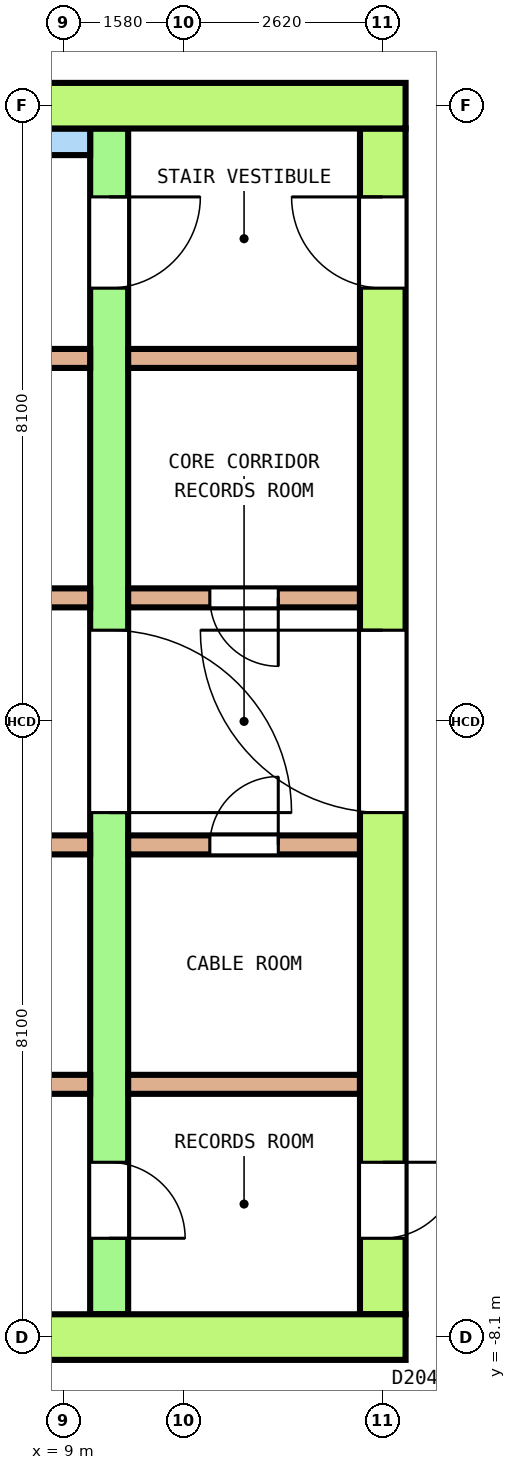
"""IFC4 building model, lengths in metres.
Left out: names, types, materials, properties, quantities, classifications, styles, units other than length and angle.
Written with IfcOpenShell. Run it as: python <this file> out.ifc"""

import sys

from ifc_helpers import new_model, si_unit, direction, frame, frame_2d, origin, place, context, subcontext, project, spatial, polyline, rectangle, outline, extrude, element, fill, save


model = new_model("IFC4")
c1 = context("Model", 3, precision=1e-05, world=origin(), true_north=direction((0.0, 1.0)))
c2 = subcontext(c1, "Body", "Model", "MODEL_VIEW")
j1 = project(units=[si_unit("LENGTHUNIT", "METRE"), si_unit("PLANEANGLEUNIT", "RADIAN")], contexts=[c1])
p1 = place(None, origin())
s1 = spatial("IfcSite", under=j1, at=p1, CompositionType="ELEMENT")
p2 = place(p1, origin())
s2 = spatial("IfcBuilding", under=s1, at=p2, CompositionType="ELEMENT")
p3 = place(p2, frame((0.0, 0.0, 245.4)))
s3 = spatial("IfcBuildingStorey", under=s2, at=p3, CompositionType="ELEMENT", Elevation=245.4)
p4 = place(p3, frame((13.515, -19.392, 0.0), z_axis=(0.0, 0.0, 1.0), x_axis=(0.499997939216, 0.866026593575, 0.0)))
e1 = element("IfcWall", 1, at=p4, inside=s3, PredefinedType="SOLIDWALL", context=c2, shape_type="SweptSolid", body=[
    extrude(outline(polyline([(-0.027, -0.1), (0.979, -0.1), (1.986, -0.1), (2.992, -0.1), (3.999, -0.1), (5.005, -0.1), (6.011, -0.1), (7.018, -0.1), (8.024, -0.1), (9.03, -0.1), (10.037, -0.1), (11.043, -0.1), (12.049, -0.1), (13.056, -0.1), (14.062, -0.1), (15.068, -0.1), (16.075, -0.1), (17.081, -0.1), (18.087, -0.1), (19.094, -0.1), (20.1, -0.1), (20.046, 0.1), (19.045, 0.1), (18.044, 0.1), (17.043, 0.1), (16.042, 0.1), (15.042, 0.1), (14.041, 0.1), (13.04, 0.1), (12.039, 0.1), (11.038, 0.1), (10.037, 0.1), (9.036, 0.1), (8.035, 0.1), (7.034, 0.1), (6.033, 0.1), (5.032, 0.1), (4.031, 0.1), (3.03, 0.1), (2.029, 0.1), (1.028, 0.1), (0.027, 0.1), (-0.027, -0.1)])), origin(), (0.0, 0.0, 1.0), 3.7),
])
p5 = place(p4, frame((0.557, 0.0, 0.1)))
e2 = element("IfcOpeningElement", 2, at=p5, cuts=e1, PredefinedType="OPENING", context=c2, shape_type="SweptSolid", body=[
    extrude(rectangle(XDim=2.9, YDim=2.65, at=frame_2d((1.45, 1.325))), frame((0.0, 0.11, 0.0), z_axis=(0.0, -1.0, 0.0), x_axis=(1.0, 0.0, 0.0)), (0.0, 0.0, 1.0), 0.22),
])
p6 = place(p4, frame((4.572, 0.0, 0.1)))
e3 = element("IfcOpeningElement", 3, at=p6, cuts=e1, PredefinedType="OPENING", context=c2, shape_type="SweptSolid", body=[
    extrude(rectangle(XDim=2.9, YDim=2.65, at=frame_2d((1.45, 1.325))), frame((0.0, 0.11, 0.0), z_axis=(0.0, -1.0, 0.0), x_axis=(1.0, 0.0, 0.0)), (0.0, 0.0, 1.0), 0.22),
])
p7 = place(p4, frame((9.137, 0.0, 0.0)))
e4 = element("IfcOpeningElement", 4, at=p7, cuts=e1, PredefinedType="OPENING", context=c2, shape_type="SweptSolid", body=[
    extrude(rectangle(XDim=1.8, YDim=2.4, at=frame_2d((0.9, 1.2))), frame((0.0, 0.11, 0.0), z_axis=(0.0, -1.0, 0.0), x_axis=(1.0, 0.0, 0.0)), (0.0, 0.0, 1.0), 0.22),
])
p8 = place(p4, frame((9.137, 0.0, 2.55)))
e5 = element("IfcOpeningElement", 5, at=p8, cuts=e1, PredefinedType="OPENING", context=c2, shape_type="SweptSolid", body=[
    extrude(rectangle(XDim=1.8, YDim=0.2, at=frame_2d((0.9, 0.1))), frame((0.0, 0.11, 0.0), z_axis=(0.0, -1.0, 0.0), x_axis=(1.0, 0.0, 0.0)), (0.0, 0.0, 1.0), 0.22),
])
p9 = place(p4, frame((12.601, 0.0, 0.1)))
e6 = element("IfcOpeningElement", 6, at=p9, cuts=e1, PredefinedType="OPENING", context=c2, shape_type="SweptSolid", body=[
    extrude(rectangle(XDim=2.9, YDim=2.65, at=frame_2d((1.45, 1.325))), frame((0.0, 0.11, 0.0), z_axis=(0.0, -1.0, 0.0), x_axis=(1.0, 0.0, 0.0)), (0.0, 0.0, 1.0), 0.22),
])
p10 = place(p4, frame((16.616, 0.0, 0.1)))
e7 = element("IfcOpeningElement", 7, at=p10, cuts=e1, PredefinedType="OPENING", context=c2, shape_type="SweptSolid", body=[
    extrude(rectangle(XDim=2.9, YDim=2.65, at=frame_2d((1.45, 1.325))), frame((0.0, 0.11, 0.0), z_axis=(0.0, -1.0, 0.0), x_axis=(1.0, 0.0, 0.0)), (0.0, 0.0, 1.0), 0.22),
])
p11 = place(p3, frame((-13.5, 8.1, 0.0), z_axis=(0.0, 0.0, 1.0), x_axis=(1.0, 0.0, 0.0)))
e8 = element("IfcWall", 8, at=p11, inside=s3, PredefinedType="SHEAR", context=c2, shape_type="SweptSolid", body=[
    extrude(rectangle(XDim=27.0, YDim=0.6, at=frame_2d((13.5, 0.0))), origin(), (0.0, 0.0, 1.0), 3.7),
])
p12 = place(p11, frame((14.425, 0.0, 0.0)))
e9 = element("IfcOpeningElement", 9, at=p12, cuts=e8, PredefinedType="OPENING", context=c2, shape_type="SweptSolid", body=[
    extrude(rectangle(XDim=1.4, YDim=2.1, at=frame_2d((0.7, 1.05))), frame((0.0, 0.31, 0.0), z_axis=(0.0, -1.0, 0.0), x_axis=(1.0, 0.0, 0.0)), (0.0, 0.0, 1.0), 0.62),
])
p13 = place(p3, frame((-13.5, -8.1, 0.0), z_axis=(0.0, 0.0, 1.0), x_axis=(1.0, 0.0, 0.0)))
e10 = element("IfcWall", 10, at=p13, inside=s3, PredefinedType="SHEAR", context=c2, shape_type="SweptSolid", body=[
    extrude(rectangle(XDim=27.0, YDim=0.6, at=frame_2d((13.5, 0.0))), origin(), (0.0, 0.0, 1.0), 3.7),
])
p14 = place(p13, frame((15.05, 0.0, 0.0)))
e11 = element("IfcOpeningElement", 11, at=p14, cuts=e10, PredefinedType="OPENING", context=c2, shape_type="SweptSolid", body=[
    extrude(rectangle(XDim=1.2, YDim=2.1, at=frame_2d((0.6, 1.05))), frame((0.0, 0.31, 0.0), z_axis=(0.0, -1.0, 0.0), x_axis=(1.0, 0.0, 0.0)), (0.0, 0.0, 1.0), 0.62),
])
p15 = place(p3, frame((13.2, -7.8, 0.0), z_axis=(0.0, 0.0, 1.0), x_axis=(0.0, 1.0, 0.0)))
e12 = element("IfcWall", 12, at=p15, inside=s3, PredefinedType="SHEAR", context=c2, shape_type="SweptSolid", body=[
    extrude(rectangle(XDim=15.6, YDim=0.6, at=frame_2d((7.8, 0.0))), origin(), (0.0, 0.0, 1.0), 3.7),
])
p16 = place(p15, frame((6.6, 0.0, 0.0)))
e13 = element("IfcOpeningElement", 13, at=p16, cuts=e12, PredefinedType="OPENING", context=c2, shape_type="SweptSolid", body=[
    extrude(rectangle(XDim=2.4, YDim=2.1, at=frame_2d((1.2, 1.05))), frame((0.0, 0.31, 0.0), z_axis=(0.0, -1.0, 0.0), x_axis=(1.0, 0.0, 0.0)), (0.0, 0.0, 1.0), 0.62),
])
p17 = place(p15, frame((13.5, 0.0, 0.0)))
e14 = element("IfcOpeningElement", 14, at=p17, cuts=e12, PredefinedType="OPENING", context=c2, shape_type="SweptSolid", body=[
    extrude(rectangle(XDim=1.2, YDim=2.1, at=frame_2d((0.6, 1.05))), frame((0.0, 0.31, 0.0), z_axis=(0.0, -1.0, 0.0), x_axis=(1.0, 0.0, 0.0)), (0.0, 0.0, 1.0), 0.62),
])
p18 = place(p15, frame((1.0, 0.0, 0.0)))
e15 = element("IfcOpeningElement", 15, at=p18, cuts=e12, PredefinedType="OPENING", context=c2, shape_type="SweptSolid", body=[
    extrude(rectangle(XDim=1.0, YDim=2.1, at=frame_2d((0.5, 1.05))), frame((0.0, 0.31, 0.0), z_axis=(0.0, -1.0, 0.0), x_axis=(1.0, 0.0, 0.0)), (0.0, 0.0, 1.0), 0.62),
])
p19 = place(p3, frame((9.6, -7.8, 0.0), z_axis=(0.0, 0.0, 1.0), x_axis=(0.0, 1.0, 0.0)))
e16 = element("IfcWall", 16, at=p19, inside=s3, PredefinedType="SHEAR", context=c2, shape_type="SweptSolid", body=[
    extrude(rectangle(XDim=15.6, YDim=0.5, at=frame_2d((7.8, 0.0))), origin(), (0.0, 0.0, 1.0), 3.7),
])
p20 = place(p19, frame((6.6, 0.0, 0.0)))
e17 = element("IfcOpeningElement", 17, at=p20, cuts=e16, PredefinedType="OPENING", context=c2, shape_type="SweptSolid", body=[
    extrude(rectangle(XDim=2.4, YDim=2.1, at=frame_2d((1.2, 1.05))), frame((0.0, 0.26, 0.0), z_axis=(0.0, -1.0, 0.0), x_axis=(1.0, 0.0, 0.0)), (0.0, 0.0, 1.0), 0.52),
])
p21 = place(p19, frame((13.5, 0.0, 0.0)))
e18 = element("IfcOpeningElement", 18, at=p21, cuts=e16, PredefinedType="OPENING", context=c2, shape_type="SweptSolid", body=[
    extrude(rectangle(XDim=1.2, YDim=2.1, at=frame_2d((0.6, 1.05))), frame((0.0, 0.26, 0.0), z_axis=(0.0, -1.0, 0.0), x_axis=(1.0, 0.0, 0.0)), (0.0, 0.0, 1.0), 0.52),
])
p22 = place(p19, frame((1.0, 0.0, 0.0)))
e19 = element("IfcOpeningElement", 19, at=p22, cuts=e16, PredefinedType="OPENING", context=c2, shape_type="SweptSolid", body=[
    extrude(rectangle(XDim=1.0, YDim=2.1, at=frame_2d((0.5, 1.05))), frame((0.0, 0.26, 0.0), z_axis=(0.0, -1.0, 0.0), x_axis=(1.0, 0.0, 0.0)), (0.0, 0.0, 1.0), 0.52),
])
p23 = place(p3, frame((-9.35, 1.625, 0.0), z_axis=(0.0, 0.0, 1.0), x_axis=(1.0, 0.0, 0.0)))
e20 = element("IfcWall", 20, at=p23, inside=s3, PredefinedType="SOLIDWALL", context=c2, shape_type="SweptSolid", body=[
    extrude(rectangle(XDim=18.7, YDim=0.25, at=frame_2d((9.35, 0.0))), origin(), (0.0, 0.0, 1.0), 3.7),
])
p24 = place(p23, frame((7.65, 0.0, 0.0)))
e21 = element("IfcOpeningElement", 21, at=p24, cuts=e20, PredefinedType="OPENING", context=c2, shape_type="SweptSolid", body=[
    extrude(rectangle(XDim=1.1, YDim=2.1, at=frame_2d((0.55, 1.05))), frame((0.0, 0.135, 0.0), z_axis=(0.0, -1.0, 0.0), x_axis=(1.0, 0.0, 0.0)), (0.0, 0.0, 1.0), 0.27),
])
p25 = place(p23, frame((9.95, 0.0, 0.0)))
e22 = element("IfcOpeningElement", 22, at=p25, cuts=e20, PredefinedType="OPENING", context=c2, shape_type="SweptSolid", body=[
    extrude(rectangle(XDim=1.1, YDim=2.1, at=frame_2d((0.55, 1.05))), frame((0.0, 0.135, 0.0), z_axis=(0.0, -1.0, 0.0), x_axis=(1.0, 0.0, 0.0)), (0.0, 0.0, 1.0), 0.27),
])
p26 = place(p23, frame((12.4, 0.0, 0.0)))
e23 = element("IfcOpeningElement", 23, at=p26, cuts=e20, PredefinedType="OPENING", context=c2, shape_type="SweptSolid", body=[
    extrude(rectangle(XDim=1.1, YDim=2.1, at=frame_2d((0.55, 1.05))), frame((0.0, 0.135, 0.0), z_axis=(0.0, -1.0, 0.0), x_axis=(1.0, 0.0, 0.0)), (0.0, 0.0, 1.0), 0.27),
])
p27 = place(p23, frame((0.575, 0.0, 0.0)))
e24 = element("IfcOpeningElement", 24, at=p27, cuts=e20, PredefinedType="OPENING", context=c2, shape_type="SweptSolid", body=[
    extrude(rectangle(XDim=0.9, YDim=2.1, at=frame_2d((0.45, 1.05))), frame((0.0, 0.135, 0.0), z_axis=(0.0, -1.0, 0.0), x_axis=(1.0, 0.0, 0.0)), (0.0, 0.0, 1.0), 0.27),
])
p28 = place(p23, frame((2.919, 0.0, 0.0)))
e25 = element("IfcOpeningElement", 25, at=p28, cuts=e20, PredefinedType="OPENING", context=c2, shape_type="SweptSolid", body=[
    extrude(rectangle(XDim=0.9, YDim=2.1, at=frame_2d((0.45, 1.05))), frame((0.0, 0.135, 0.0), z_axis=(0.0, -1.0, 0.0), x_axis=(1.0, 0.0, 0.0)), (0.0, 0.0, 1.0), 0.27),
])
p29 = place(p23, frame((5.281, 0.0, 0.0)))
e26 = element("IfcOpeningElement", 26, at=p29, cuts=e20, PredefinedType="OPENING", context=c2, shape_type="SweptSolid", body=[
    extrude(rectangle(XDim=0.9, YDim=2.1, at=frame_2d((0.45, 1.05))), frame((0.0, 0.135, 0.0), z_axis=(0.0, -1.0, 0.0), x_axis=(1.0, 0.0, 0.0)), (0.0, 0.0, 1.0), 0.27),
])
p30 = place(p23, frame((14.9, 0.0, 0.0)))
e27 = element("IfcOpeningElement", 27, at=p30, cuts=e20, PredefinedType="OPENING", context=c2, shape_type="SweptSolid", body=[
    extrude(rectangle(XDim=0.9, YDim=2.1, at=frame_2d((0.45, 1.05))), frame((0.0, 0.135, 0.0), z_axis=(0.0, -1.0, 0.0), x_axis=(1.0, 0.0, 0.0)), (0.0, 0.0, 1.0), 0.27),
])
p31 = place(p23, frame((17.225, 0.0, 0.0)))
e28 = element("IfcOpeningElement", 28, at=p31, cuts=e20, PredefinedType="OPENING", context=c2, shape_type="SweptSolid", body=[
    extrude(rectangle(XDim=0.9, YDim=2.1, at=frame_2d((0.45, 1.05))), frame((0.0, 0.135, 0.0), z_axis=(0.0, -1.0, 0.0), x_axis=(1.0, 0.0, 0.0)), (0.0, 0.0, 1.0), 0.27),
])
p32 = place(p3, frame((9.85, 1.625, 0.0), z_axis=(0.0, 0.0, 1.0), x_axis=(1.0, 0.0, 0.0)))
e29 = element("IfcWall", 29, at=p32, inside=s3, PredefinedType="SOLIDWALL", context=c2, shape_type="SweptSolid", body=[
    extrude(rectangle(XDim=3.05, YDim=0.25, at=frame_2d((1.525, 0.0))), origin(), (0.0, 0.0, 1.0), 3.7),
])
p33 = place(p32, frame((1.075, 0.0, 0.0)))
e30 = element("IfcOpeningElement", 30, at=p33, cuts=e29, PredefinedType="OPENING", context=c2, shape_type="SweptSolid", body=[
    extrude(rectangle(XDim=0.9, YDim=2.1, at=frame_2d((0.45, 1.05))), frame((0.0, 0.135, 0.0), z_axis=(0.0, -1.0, 0.0), x_axis=(1.0, 0.0, 0.0)), (0.0, 0.0, 1.0), 0.27),
])
p34 = place(p3, frame((-9.35, 4.775, 0.0), z_axis=(0.0, 0.0, 1.0), x_axis=(1.0, 0.0, 0.0)))
e31 = element("IfcWall", 31, at=p34, inside=s3, PredefinedType="SOLIDWALL", context=c2, shape_type="SweptSolid", body=[
    extrude(rectangle(XDim=18.7, YDim=0.25, at=frame_2d((9.35, 0.0))), origin(), (0.0, 0.0, 1.0), 3.7),
])
p35 = place(p3, frame((9.85, 4.775, 0.0), z_axis=(0.0, 0.0, 1.0), x_axis=(1.0, 0.0, 0.0)))
e32 = element("IfcWall", 32, at=p35, inside=s3, PredefinedType="SOLIDWALL", context=c2, shape_type="SweptSolid", body=[
    extrude(rectangle(XDim=3.05, YDim=0.25, at=frame_2d((1.525, 0.0))), origin(), (0.0, 0.0, 1.0), 3.7),
])
p36 = place(p3, frame((-9.35, -1.625, 0.0), z_axis=(0.0, 0.0, 1.0), x_axis=(1.0, 0.0, 0.0)))
e33 = element("IfcWall", 33, at=p36, inside=s3, PredefinedType="SOLIDWALL", context=c2, shape_type="SweptSolid", body=[
    extrude(rectangle(XDim=18.7, YDim=0.25, at=frame_2d((9.35, 0.0))), origin(), (0.0, 0.0, 1.0), 3.7),
])
p37 = place(p36, frame((7.65, 0.0, 0.0)))
e34 = element("IfcOpeningElement", 34, at=p37, cuts=e33, PredefinedType="OPENING", context=c2, shape_type="SweptSolid", body=[
    extrude(rectangle(XDim=1.1, YDim=2.1, at=frame_2d((0.55, 1.05))), frame((0.0, 0.135, 0.0), z_axis=(0.0, -1.0, 0.0), x_axis=(1.0, 0.0, 0.0)), (0.0, 0.0, 1.0), 0.27),
])
p38 = place(p36, frame((9.95, 0.0, 0.0)))
e35 = element("IfcOpeningElement", 35, at=p38, cuts=e33, PredefinedType="OPENING", context=c2, shape_type="SweptSolid", body=[
    extrude(rectangle(XDim=1.1, YDim=2.1, at=frame_2d((0.55, 1.05))), frame((0.0, 0.135, 0.0), z_axis=(0.0, -1.0, 0.0), x_axis=(1.0, 0.0, 0.0)), (0.0, 0.0, 1.0), 0.27),
])
p39 = place(p36, frame((12.4, 0.0, 0.0)))
e36 = element("IfcOpeningElement", 36, at=p39, cuts=e33, PredefinedType="OPENING", context=c2, shape_type="SweptSolid", body=[
    extrude(rectangle(XDim=1.1, YDim=2.1, at=frame_2d((0.55, 1.05))), frame((0.0, 0.135, 0.0), z_axis=(0.0, -1.0, 0.0), x_axis=(1.0, 0.0, 0.0)), (0.0, 0.0, 1.0), 0.27),
])
p40 = place(p36, frame((0.575, 0.0, 0.0)))
e37 = element("IfcOpeningElement", 37, at=p40, cuts=e33, PredefinedType="OPENING", context=c2, shape_type="SweptSolid", body=[
    extrude(rectangle(XDim=0.9, YDim=2.1, at=frame_2d((0.45, 1.05))), frame((0.0, 0.135, 0.0), z_axis=(0.0, -1.0, 0.0), x_axis=(1.0, 0.0, 0.0)), (0.0, 0.0, 1.0), 0.27),
])
p41 = place(p36, frame((2.519, 0.0, 0.0)))
e38 = element("IfcOpeningElement", 38, at=p41, cuts=e33, PredefinedType="OPENING", context=c2, shape_type="SweptSolid", body=[
    extrude(rectangle(XDim=0.9, YDim=2.1, at=frame_2d((0.45, 1.05))), frame((0.0, 0.135, 0.0), z_axis=(0.0, -1.0, 0.0), x_axis=(1.0, 0.0, 0.0)), (0.0, 0.0, 1.0), 0.27),
])
p42 = place(p36, frame((4.881, 0.0, 0.0)))
e39 = element("IfcOpeningElement", 39, at=p42, cuts=e33, PredefinedType="OPENING", context=c2, shape_type="SweptSolid", body=[
    extrude(rectangle(XDim=0.9, YDim=2.1, at=frame_2d((0.45, 1.05))), frame((0.0, 0.135, 0.0), z_axis=(0.0, -1.0, 0.0), x_axis=(1.0, 0.0, 0.0)), (0.0, 0.0, 1.0), 0.27),
])
p43 = place(p36, frame((14.9, 0.0, 0.0)))
e40 = element("IfcOpeningElement", 40, at=p43, cuts=e33, PredefinedType="OPENING", context=c2, shape_type="SweptSolid", body=[
    extrude(rectangle(XDim=0.9, YDim=2.1, at=frame_2d((0.45, 1.05))), frame((0.0, 0.135, 0.0), z_axis=(0.0, -1.0, 0.0), x_axis=(1.0, 0.0, 0.0)), (0.0, 0.0, 1.0), 0.27),
])
p44 = place(p36, frame((17.225, 0.0, 0.0)))
e41 = element("IfcOpeningElement", 41, at=p44, cuts=e33, PredefinedType="OPENING", context=c2, shape_type="SweptSolid", body=[
    extrude(rectangle(XDim=0.9, YDim=2.1, at=frame_2d((0.45, 1.05))), frame((0.0, 0.135, 0.0), z_axis=(0.0, -1.0, 0.0), x_axis=(1.0, 0.0, 0.0)), (0.0, 0.0, 1.0), 0.27),
])
p45 = place(p3, frame((9.85, -1.625, 0.0), z_axis=(0.0, 0.0, 1.0), x_axis=(1.0, 0.0, 0.0)))
e42 = element("IfcWall", 42, at=p45, inside=s3, PredefinedType="SOLIDWALL", context=c2, shape_type="SweptSolid", body=[
    extrude(rectangle(XDim=3.05, YDim=0.25, at=frame_2d((1.525, 0.0))), origin(), (0.0, 0.0, 1.0), 3.7),
])
p46 = place(p45, frame((1.075, 0.0, 0.0)))
e43 = element("IfcOpeningElement", 43, at=p46, cuts=e42, PredefinedType="OPENING", context=c2, shape_type="SweptSolid", body=[
    extrude(rectangle(XDim=0.9, YDim=2.1, at=frame_2d((0.45, 1.05))), frame((0.0, 0.135, 0.0), z_axis=(0.0, -1.0, 0.0), x_axis=(1.0, 0.0, 0.0)), (0.0, 0.0, 1.0), 0.27),
])
p47 = place(p3, frame((-9.35, -4.775, 0.0), z_axis=(0.0, 0.0, 1.0), x_axis=(1.0, 0.0, 0.0)))
e44 = element("IfcWall", 44, at=p47, inside=s3, PredefinedType="SOLIDWALL", context=c2, shape_type="SweptSolid", body=[
    extrude(rectangle(XDim=18.7, YDim=0.25, at=frame_2d((9.35, 0.0))), origin(), (0.0, 0.0, 1.0), 3.7),
])
p48 = place(p3, frame((9.85, -4.775, 0.0), z_axis=(0.0, 0.0, 1.0), x_axis=(1.0, 0.0, 0.0)))
e45 = element("IfcWall", 45, at=p48, inside=s3, PredefinedType="SOLIDWALL", context=c2, shape_type="SweptSolid", body=[
    extrude(rectangle(XDim=3.05, YDim=0.25, at=frame_2d((1.525, 0.0))), origin(), (0.0, 0.0, 1.0), 3.7),
])
p49 = place(p3, frame((3.55, 7.625, 0.0), z_axis=(0.0, 0.0, 1.0), x_axis=(1.0, 0.0, 0.0)))
e46 = element("IfcWall", 46, at=p49, inside=s3, PredefinedType="SOLIDWALL", context=c2, shape_type="SweptSolid", body=[
    extrude(rectangle(XDim=5.8, YDim=0.35, at=frame_2d((2.9, 0.0))), origin(), (0.0, 0.0, 1.0), 3.7),
])
p50 = place(p20, origin())
e47 = element("IfcDoor", 47, at=p50, inside=s3, OperationType="DOUBLE_DOOR_SINGLE_SWING", PredefinedType="DOOR", context=c2, shape_type="SweptSolid", body=[
    extrude(rectangle(XDim=2.4, YDim=2.1, at=frame_2d((1.2, 1.05))), frame((0.0, 0.2, 0.0), z_axis=(0.0, -1.0, 0.0), x_axis=(1.0, 0.0, 0.0)), (0.0, 0.0, 1.0), 0.4),
])
fill(e17, e47)
p51 = place(p16, origin())
e48 = element("IfcDoor", 48, at=p51, inside=s3, OperationType="DOUBLE_DOOR_SINGLE_SWING", PredefinedType="DOOR", context=c2, shape_type="SweptSolid", body=[
    extrude(rectangle(XDim=2.4, YDim=2.1, at=frame_2d((1.2, 1.05))), frame((0.0, 0.25, 0.0), z_axis=(0.0, -1.0, 0.0), x_axis=(1.0, 0.0, 0.0)), (0.0, 0.0, 1.0), 0.5),
])
fill(e13, e48)
p52 = place(p21, origin())
e49 = element("IfcDoor", 49, at=p52, inside=s3, OperationType="SINGLE_SWING_RIGHT", PredefinedType="DOOR", context=c2, shape_type="SweptSolid", body=[
    extrude(rectangle(XDim=1.2, YDim=2.1, at=frame_2d((0.6, 1.05))), frame((0.0, 0.2, 0.0), z_axis=(0.0, -1.0, 0.0), x_axis=(1.0, 0.0, 0.0)), (0.0, 0.0, 1.0), 0.4),
])
fill(e18, e49)
p53 = place(p17, origin())
e50 = element("IfcDoor", 50, at=p53, inside=s3, OperationType="SINGLE_SWING_LEFT", PredefinedType="DOOR", context=c2, shape_type="SweptSolid", body=[
    extrude(rectangle(XDim=1.2, YDim=2.1, at=frame_2d((0.6, 1.05))), frame((0.0, 0.25, 0.0), z_axis=(0.0, -1.0, 0.0), x_axis=(1.0, 0.0, 0.0)), (0.0, 0.0, 1.0), 0.5),
])
fill(e14, e50)
p54 = place(p22, origin())
e51 = element("IfcDoor", 51, at=p54, inside=s3, OperationType="SINGLE_SWING_RIGHT", PredefinedType="DOOR", context=c2, shape_type="SweptSolid", body=[
    extrude(rectangle(XDim=1.0, YDim=2.1, at=frame_2d((0.5, 1.05))), frame((0.0, 0.2, 0.0), z_axis=(0.0, -1.0, 0.0), x_axis=(1.0, 0.0, 0.0)), (0.0, 0.0, 1.0), 0.4),
])
fill(e19, e51)
p55 = place(p18, origin())
e52 = element("IfcDoor", 52, at=p55, inside=s3, OperationType="SINGLE_SWING_LEFT", PredefinedType="DOOR", context=c2, shape_type="SweptSolid", body=[
    extrude(rectangle(XDim=1.0, YDim=2.1, at=frame_2d((0.5, 1.05))), frame((0.0, 0.25, 0.0), z_axis=(0.0, -1.0, 0.0), x_axis=(1.0, 0.0, 0.0)), (0.0, 0.0, 1.0), 0.5),
])
fill(e15, e52)
p56 = place(p33, origin())
e53 = element("IfcDoor", 53, at=p56, inside=s3, OperationType="SINGLE_SWING_RIGHT", PredefinedType="DOOR", context=c2, shape_type="SweptSolid", body=[
    extrude(rectangle(XDim=0.9, YDim=2.1, at=frame_2d((0.45, 1.05))), frame((0.0, 0.075, 0.0), z_axis=(0.0, -1.0, 0.0), x_axis=(1.0, 0.0, 0.0)), (0.0, 0.0, 1.0), 0.15),
])
fill(e30, e53)
p57 = place(p46, origin())
e54 = element("IfcDoor", 54, at=p57, inside=s3, OperationType="SINGLE_SWING_LEFT", PredefinedType="DOOR", context=c2, shape_type="SweptSolid", body=[
    extrude(rectangle(XDim=0.9, YDim=2.1, at=frame_2d((0.45, 1.05))), frame((0.0, 0.075, 0.0), z_axis=(0.0, -1.0, 0.0), x_axis=(1.0, 0.0, 0.0)), (0.0, 0.0, 1.0), 0.15),
])
fill(e43, e54)
save(model, sys.argv[1])
